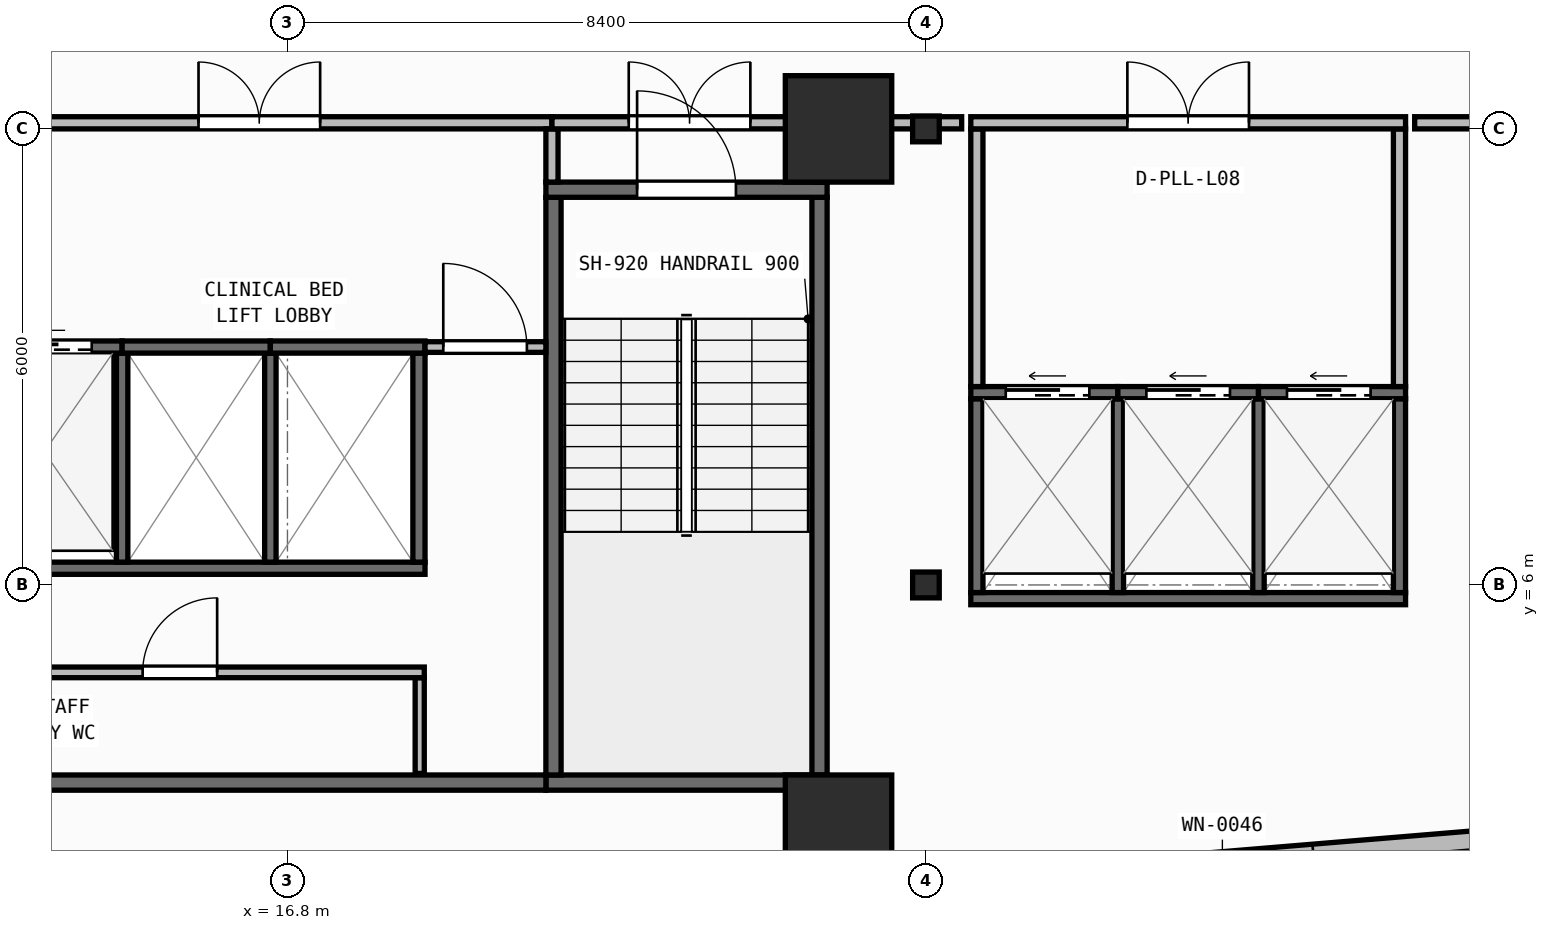
"""IFC4 building model, lengths in metres.
Left out: names, types, materials, properties, quantities, classifications, styles, units other than length and angle.
Written with IfcOpenShell. Run it as: python <this file> out.ifc"""

import sys

from ifc_helpers import new_model, si_unit, direction, frame, frame_2d, origin, origin_2d, place, context, subcontext, project, spatial, rectangle, i_section, extrude, element, fill, save


model = new_model("IFC4")
c1 = context("Model", 3, precision=1e-05, world=origin(), true_north=direction((0.0, 1.0)))
c2 = subcontext(c1, "Body", "Model", "MODEL_VIEW")
j1 = project(units=[si_unit("LENGTHUNIT", "METRE"), si_unit("PLANEANGLEUNIT", "RADIAN")], contexts=[c1])
p1 = place(None, origin())
s1 = spatial("IfcSite", under=j1, at=p1, CompositionType="ELEMENT")
p2 = place(p1, origin())
s2 = spatial("IfcBuilding", under=s1, at=p2, CompositionType="ELEMENT")
p3 = place(p2, frame((0.0, 0.0, 34.35)))
s3 = spatial("IfcBuildingStorey", under=s2, at=p3, CompositionType="ELEMENT", Elevation=34.35)
p4 = place(p3, frame((24.05, 2.8, 0.0), z_axis=(0.0, 0.0, 1.0), x_axis=(1.0, 0.0, 0.0)))
e1 = element("IfcColumn", 1, at=p4, inside=s3, PredefinedType="COLUMN", context=c2, shape_type="SweptSolid", body=[
    extrude(rectangle(XDim=1.4, YDim=1.4, at=origin_2d()), origin(), (0.0, 0.0, 1.0), 3.95),
])
p5 = place(p3, frame((25.2, 6.0, 0.0), z_axis=(0.0, 0.0, 1.0), x_axis=(1.0, 0.0, 0.0)))
e2 = element("IfcColumn", 2, at=p5, inside=s3, PredefinedType="COLUMN", context=c2, shape_type="SweptSolid", body=[
    extrude(i_section(OverallWidth=0.35, OverallDepth=0.34, WebThickness=0.016, FlangeThickness=0.028, at=origin_2d()), origin(), (0.0, 0.0, 1.0), 3.95),
])
p6 = place(p3, frame((24.05, 12.0, 0.0), z_axis=(0.0, 0.0, 1.0), x_axis=(1.0, 0.0, 0.0)))
e3 = element("IfcColumn", 3, at=p6, inside=s3, PredefinedType="COLUMN", context=c2, shape_type="SweptSolid", body=[
    extrude(rectangle(XDim=1.4, YDim=1.4, at=origin_2d()), origin(), (0.0, 0.0, 1.0), 3.95),
])
p7 = place(p3, frame((25.2, 12.0, 0.0), z_axis=(0.0, 0.0, 1.0), x_axis=(1.0, 0.0, 0.0)))
e4 = element("IfcColumn", 4, at=p7, inside=s3, PredefinedType="COLUMN", context=c2, shape_type="SweptSolid", body=[
    extrude(i_section(OverallWidth=0.35, OverallDepth=0.34, WebThickness=0.016, FlangeThickness=0.028, at=origin_2d()), origin(), (0.0, 0.0, 1.0), 3.95),
])
p8 = place(p3, frame((2.76, 0.174, 0.0), z_axis=(0.0, 0.0, 1.0), x_axis=(0.996571478456, 0.082736257641, 0.0)))
e5 = element("IfcWall", 5, at=p8, inside=s3, PredefinedType="STANDARD", context=c2, shape_type="SweptSolid", body=[
    extrude(rectangle(XDim=52.861, YDim=0.26, at=frame_2d((26.431, 0.0))), origin(), (0.0, 0.0, 1.0), 3.71),
])
p9 = place(p8, frame((25.231, 0.0, 0.9)))
e6 = element("IfcOpeningElement", 6, at=p9, cuts=e5, PredefinedType="OPENING", context=c2, shape_type="SweptSolid", body=[
    extrude(rectangle(XDim=2.4, YDim=1.65, at=frame_2d((1.2, 0.825))), frame((0.0, 0.14, 0.0), z_axis=(0.0, -1.0, 0.0), x_axis=(1.0, 0.0, 0.0)), (0.0, 0.0, 1.0), 0.28),
])
p10 = place(p3, frame((20.2, 3.4, 0.0), z_axis=(0.0, 0.0, 1.0), x_axis=(1.0, 0.0, 0.0)))
e7 = element("IfcWall", 7, at=p10, inside=s3, PredefinedType="SHEAR", context=c2, shape_type="SweptSolid", body=[
    extrude(rectangle(XDim=3.7, YDim=0.2, at=frame_2d((1.85, 0.0))), origin(), (0.0, 0.0, 1.0), 3.71),
])
for number, where, z_axis, x_axis in (
    (8, (20.3, 3.5, 0.0), (0.0, 0.0, 1.0), (0.0, 1.0, 0.0)),
    (9, (23.8, 3.5, 0.0), (0.0, 0.0, 1.0), (0.0, 1.0, 0.0)),
):
    element("IfcWall", number, at=place(p3, frame(where, z_axis=z_axis, x_axis=x_axis)), inside=s3, PredefinedType="SHEAR", context=c2, shape_type="SweptSolid", body=[
        extrude(rectangle(XDim=7.6, YDim=0.2, at=frame_2d((3.8, 0.0))), origin(), (0.0, 0.0, 1.0), 3.71),
    ])
p11 = place(p3, frame((20.2, 11.2, 0.0), z_axis=(0.0, 0.0, 1.0), x_axis=(1.0, 0.0, 0.0)))
e10 = element("IfcWall", 10, at=p11, inside=s3, PredefinedType="SHEAR", context=c2, shape_type="SweptSolid", body=[
    extrude(rectangle(XDim=3.7, YDim=0.2, at=frame_2d((1.85, 0.0))), origin(), (0.0, 0.0, 1.0), 3.71),
])
p12 = place(p11, frame((1.2, 0.0, 0.0)))
e11 = element("IfcOpeningElement", 11, at=p12, cuts=e10, PredefinedType="OPENING", context=c2, shape_type="SweptSolid", body=[
    extrude(rectangle(XDim=1.3, YDim=2.15, at=frame_2d((0.65, 1.075))), frame((0.0, 0.11, 0.0), z_axis=(0.0, -1.0, 0.0), x_axis=(1.0, 0.0, 0.0)), (0.0, 0.0, 1.0), 0.22),
])
p13 = place(p3, frame((6.5, 3.4, 0.0), z_axis=(0.0, 0.0, 1.0), x_axis=(1.0, 0.0, 0.0)))
e12 = element("IfcWall", 12, at=p13, inside=s3, PredefinedType="SHEAR", context=c2, shape_type="SweptSolid", body=[
    extrude(rectangle(XDim=13.7, YDim=0.2, at=frame_2d((6.85, 0.0))), origin(), (0.0, 0.0, 1.0), 3.71),
])
p14 = place(p3, frame((6.5, 6.22, 0.0), z_axis=(0.0, 0.0, 1.0), x_axis=(1.0, 0.0, 0.0)))
e13 = element("IfcWall", 13, at=p14, inside=s3, PredefinedType="SHEAR", context=c2, shape_type="SweptSolid", body=[
    extrude(rectangle(XDim=12.11, YDim=0.16, at=frame_2d((6.055, 0.0))), origin(), (0.0, 0.0, 1.0), 3.71),
])
p15 = place(p3, frame((18.53, 6.3, 0.0), z_axis=(0.0, 0.0, 1.0), x_axis=(0.0, 1.0, 0.0)))
e14 = element("IfcWall", 14, at=p15, inside=s3, PredefinedType="SHEAR", context=c2, shape_type="SweptSolid", body=[
    extrude(rectangle(XDim=2.75, YDim=0.16, at=frame_2d((1.375, 0.0))), origin(), (0.0, 0.0, 1.0), 3.71),
])
for number, where, z_axis, x_axis in (
    (15, (14.625, 6.3, 0.0), (0.0, 0.0, 1.0), (0.0, 1.0, 0.0)),
    (16, (16.575, 6.3, 0.0), (0.0, 0.0, 1.0), (0.0, 1.0, 0.0)),
):
    element("IfcWall", number, at=place(p3, frame(where, z_axis=z_axis, x_axis=x_axis)), inside=s3, PredefinedType="SHEAR", context=c2, shape_type="SweptSolid", body=[
        extrude(rectangle(XDim=2.75, YDim=0.15, at=frame_2d((1.375, 0.0))), origin(), (0.0, 0.0, 1.0), 3.71),
    ])
p16 = place(p3, frame((12.575, 9.13, 0.0), z_axis=(0.0, 0.0, 1.0), x_axis=(1.0, 0.0, 0.0)))
e17 = element("IfcWall", 17, at=p16, inside=s3, PredefinedType="SHEAR", context=c2, shape_type="SweptSolid", body=[
    extrude(rectangle(XDim=2.05, YDim=0.16, at=frame_2d((1.025, 0.0))), origin(), (0.0, 0.0, 1.0), 3.71),
])
p17 = place(p16, frame((0.4, 0.0, 0.0)))
e18 = element("IfcOpeningElement", 18, at=p17, cuts=e17, PredefinedType="OPENING", context=c2, shape_type="SweptSolid", body=[
    extrude(rectangle(XDim=1.25, YDim=2.15, at=frame_2d((0.625, 1.075))), frame((0.0, 0.09, 0.0), z_axis=(0.0, -1.0, 0.0), x_axis=(1.0, 0.0, 0.0)), (0.0, 0.0, 1.0), 0.18),
])
p18 = place(p3, frame((14.625, 9.13, 0.0), z_axis=(0.0, 0.0, 1.0), x_axis=(1.0, 0.0, 0.0)))
e19 = element("IfcWall", 19, at=p18, inside=s3, PredefinedType="SHEAR", context=c2, shape_type="SweptSolid", body=[
    extrude(rectangle(XDim=1.95, YDim=0.16, at=frame_2d((0.975, 0.0))), origin(), (0.0, 0.0, 1.0), 3.71),
])
p19 = place(p3, frame((16.575, 9.13, 0.0), z_axis=(0.0, 0.0, 1.0), x_axis=(1.0, 0.0, 0.0)))
e20 = element("IfcWall", 20, at=p19, inside=s3, PredefinedType="SHEAR", context=c2, shape_type="SweptSolid", body=[
    extrude(rectangle(XDim=2.035, YDim=0.16, at=frame_2d((1.018, 0.0))), origin(), (0.0, 0.0, 1.0), 3.71),
])
p20 = place(p3, frame((25.79, 5.82, 0.0), z_axis=(0.0, 0.0, 1.0), x_axis=(1.0, 0.0, 0.0)))
e21 = element("IfcWall", 21, at=p20, inside=s3, PredefinedType="SHEAR", context=c2, shape_type="SweptSolid", body=[
    extrude(rectangle(XDim=5.72, YDim=0.16, at=frame_2d((2.86, 0.0))), origin(), (0.0, 0.0, 1.0), 3.71),
])
for number, where, z_axis, x_axis in (
    (22, (25.87, 5.9, 0.0), (0.0, 0.0, 1.0), (0.0, 1.0, 0.0)),
    (23, (31.43, 5.9, 0.0), (0.0, 0.0, 1.0), (0.0, 1.0, 0.0)),
):
    element("IfcWall", number, at=place(p3, frame(where, z_axis=z_axis, x_axis=x_axis)), inside=s3, PredefinedType="SHEAR", context=c2, shape_type="SweptSolid", body=[
        extrude(rectangle(XDim=2.55, YDim=0.16, at=frame_2d((1.275, 0.0))), origin(), (0.0, 0.0, 1.0), 3.71),
    ])
for number, where, z_axis, x_axis in (
    (24, (27.725, 5.9, 0.0), (0.0, 0.0, 1.0), (0.0, 1.0, 0.0)),
    (25, (29.575, 5.9, 0.0), (0.0, 0.0, 1.0), (0.0, 1.0, 0.0)),
):
    element("IfcWall", number, at=place(p3, frame(where, z_axis=z_axis, x_axis=x_axis)), inside=s3, PredefinedType="SHEAR", context=c2, shape_type="SweptSolid", body=[
        extrude(rectangle(XDim=2.55, YDim=0.15, at=frame_2d((1.275, 0.0))), origin(), (0.0, 0.0, 1.0), 3.71),
    ])
p21 = place(p3, frame((25.79, 8.53, 0.0), z_axis=(0.0, 0.0, 1.0), x_axis=(1.0, 0.0, 0.0)))
e26 = element("IfcWall", 26, at=p21, inside=s3, PredefinedType="SHEAR", context=c2, shape_type="SweptSolid", body=[
    extrude(rectangle(XDim=1.935, YDim=0.16, at=frame_2d((0.968, 0.0))), origin(), (0.0, 0.0, 1.0), 3.71),
])
p22 = place(p21, frame((0.46, 0.0, 0.0)))
e27 = element("IfcOpeningElement", 27, at=p22, cuts=e26, PredefinedType="OPENING", context=c2, shape_type="SweptSolid", body=[
    extrude(rectangle(XDim=1.1, YDim=2.15, at=frame_2d((0.55, 1.075))), frame((0.0, 0.09, 0.0), z_axis=(0.0, -1.0, 0.0), x_axis=(1.0, 0.0, 0.0)), (0.0, 0.0, 1.0), 0.18),
])
p23 = place(p3, frame((27.725, 8.53, 0.0), z_axis=(0.0, 0.0, 1.0), x_axis=(1.0, 0.0, 0.0)))
e28 = element("IfcWall", 28, at=p23, inside=s3, PredefinedType="SHEAR", context=c2, shape_type="SweptSolid", body=[
    extrude(rectangle(XDim=1.85, YDim=0.16, at=frame_2d((0.925, 0.0))), origin(), (0.0, 0.0, 1.0), 3.71),
])
p24 = place(p23, frame((0.375, 0.0, 0.0)))
e29 = element("IfcOpeningElement", 29, at=p24, cuts=e28, PredefinedType="OPENING", context=c2, shape_type="SweptSolid", body=[
    extrude(rectangle(XDim=1.1, YDim=2.15, at=frame_2d((0.55, 1.075))), frame((0.0, 0.09, 0.0), z_axis=(0.0, -1.0, 0.0), x_axis=(1.0, 0.0, 0.0)), (0.0, 0.0, 1.0), 0.18),
])
p25 = place(p3, frame((29.575, 8.53, 0.0), z_axis=(0.0, 0.0, 1.0), x_axis=(1.0, 0.0, 0.0)))
e30 = element("IfcWall", 30, at=p25, inside=s3, PredefinedType="SHEAR", context=c2, shape_type="SweptSolid", body=[
    extrude(rectangle(XDim=1.935, YDim=0.16, at=frame_2d((0.968, 0.0))), origin(), (0.0, 0.0, 1.0), 3.71),
])
p26 = place(p25, frame((0.375, 0.0, 0.0)))
e31 = element("IfcOpeningElement", 31, at=p26, cuts=e30, PredefinedType="OPENING", context=c2, shape_type="SweptSolid", body=[
    extrude(rectangle(XDim=1.1, YDim=2.15, at=frame_2d((0.55, 1.075))), frame((0.0, 0.09, 0.0), z_axis=(0.0, -1.0, 0.0), x_axis=(1.0, 0.0, 0.0)), (0.0, 0.0, 1.0), 0.18),
])
p27 = place(p3, frame((18.54, 3.52, 0.0), z_axis=(0.0, 0.0, 1.0), x_axis=(0.0, 1.0, 0.0)))
e32 = element("IfcWall", 32, at=p27, inside=s3, PredefinedType="PARTITIONING", context=c2, shape_type="SweptSolid", body=[
    extrude(rectangle(XDim=1.26, YDim=0.12, at=frame_2d((0.63, 0.0))), origin(), (0.0, 0.0, 1.0), 3.71),
])
p28 = place(p3, frame((12.17, 4.85, 0.0), z_axis=(0.0, 0.0, 1.0), x_axis=(1.0, 0.0, 0.0)))
e33 = element("IfcWall", 33, at=p28, inside=s3, PredefinedType="PARTITIONING", context=c2, shape_type="SweptSolid", body=[
    extrude(rectangle(XDim=6.43, YDim=0.14, at=frame_2d((3.215, 0.0))), origin(), (0.0, 0.0, 1.0), 3.71),
])
p29 = place(p28, frame((2.725, 0.0, 0.0)))
e34 = element("IfcOpeningElement", 34, at=p29, cuts=e33, PredefinedType="OPENING", context=c2, shape_type="SweptSolid", body=[
    extrude(rectangle(XDim=0.98, YDim=2.1, at=frame_2d((0.49, 1.05))), frame((0.0, 0.08, 0.0), z_axis=(0.0, -1.0, 0.0), x_axis=(1.0, 0.0, 0.0)), (0.0, 0.0, 1.0), 0.16),
])
p30 = place(p3, frame((18.61, 9.13, 0.0), z_axis=(0.0, 0.0, 1.0), x_axis=(1.0, 0.0, 0.0)))
e35 = element("IfcWall", 35, at=p30, inside=s3, PredefinedType="PARTITIONING", context=c2, shape_type="SweptSolid", body=[
    extrude(rectangle(XDim=1.59, YDim=0.14, at=frame_2d((0.795, 0.0))), origin(), (0.0, 0.0, 1.0), 3.71),
])
p31 = place(p30, frame((0.24, 0.0, 0.0)))
e36 = element("IfcOpeningElement", 36, at=p31, cuts=e35, PredefinedType="OPENING", context=c2, shape_type="SweptSolid", body=[
    extrude(rectangle(XDim=1.1, YDim=2.1, at=frame_2d((0.55, 1.05))), frame((0.0, 0.08, 0.0), z_axis=(0.0, -1.0, 0.0), x_axis=(1.0, 0.0, 0.0)), (0.0, 0.0, 1.0), 0.16),
])
p32 = place(p3, frame((12.58, 12.08, 0.0), z_axis=(0.0, 0.0, 1.0), x_axis=(1.0, 0.0, 0.0)))
e37 = element("IfcWall", 37, at=p32, inside=s3, PredefinedType="PARTITIONING", context=c2, shape_type="SweptSolid", body=[
    extrude(rectangle(XDim=7.7, YDim=0.16, at=frame_2d((3.85, 0.0))), origin(), (0.0, 0.0, 1.0), 3.073),
])
p33 = place(p32, frame((3.05, 0.0, 0.0)))
e38 = element("IfcOpeningElement", 38, at=p33, cuts=e37, PredefinedType="OPENING", context=c2, shape_type="SweptSolid", body=[
    extrude(rectangle(XDim=1.6, YDim=2.05, at=frame_2d((0.8, 1.025))), frame((0.0, 0.09, 0.0), z_axis=(0.0, -1.0, 0.0), x_axis=(1.0, 0.0, 0.0)), (0.0, 0.0, 1.0), 0.18),
])
p34 = place(p3, frame((20.28, 11.3, 0.0), z_axis=(0.0, 0.0, 1.0), x_axis=(0.0, 1.0, 0.0)))
e39 = element("IfcWall", 39, at=p34, inside=s3, PredefinedType="PARTITIONING", context=c2, shape_type="SweptSolid", body=[
    extrude(rectangle(XDim=0.7, YDim=0.16, at=frame_2d((0.35, 0.0))), origin(), (0.0, 0.0, 1.0), 3.71),
])
p35 = place(p3, frame((20.28, 12.08, 0.0), z_axis=(0.0, 0.0, 1.0), x_axis=(1.0, 0.0, 0.0)))
e40 = element("IfcWall", 40, at=p35, inside=s3, PredefinedType="PARTITIONING", context=c2, shape_type="SweptSolid", body=[
    extrude(rectangle(XDim=3.62, YDim=0.16, at=frame_2d((1.81, 0.0))), origin(), (0.0, 0.0, 1.0), 3.073),
])
p36 = place(p35, frame((1.01, 0.0, 0.0)))
e41 = element("IfcOpeningElement", 41, at=p36, cuts=e40, PredefinedType="OPENING", context=c2, shape_type="SweptSolid", body=[
    extrude(rectangle(XDim=1.6, YDim=2.05, at=frame_2d((0.8, 1.025))), frame((0.0, 0.09, 0.0), z_axis=(0.0, -1.0, 0.0), x_axis=(1.0, 0.0, 0.0)), (0.0, 0.0, 1.0), 0.18),
])
p37 = place(p3, frame((23.82, 11.3, 0.0), z_axis=(0.0, 0.0, 1.0), x_axis=(0.0, 1.0, 0.0)))
e42 = element("IfcWall", 42, at=p37, inside=s3, PredefinedType="PARTITIONING", context=c2, shape_type="SweptSolid", body=[
    extrude(rectangle(XDim=0.7, YDim=0.16, at=frame_2d((0.35, 0.0))), origin(), (0.0, 0.0, 1.0), 3.71),
])
for number, where, z_axis, x_axis in (
    (43, (25.87, 8.61, 0.0), (0.0, 0.0, 1.0), (0.0, 1.0, 0.0)),
    (44, (31.43, 8.61, 0.0), (0.0, 0.0, 1.0), (0.0, 1.0, 0.0)),
):
    element("IfcWall", number, at=place(p3, frame(where, z_axis=z_axis, x_axis=x_axis)), inside=s3, PredefinedType="PARTITIONING", context=c2, shape_type="SweptSolid", body=[
        extrude(rectangle(XDim=3.39, YDim=0.16, at=frame_2d((1.695, 0.0))), origin(), (0.0, 0.0, 1.0), 3.71),
    ])
p38 = place(p3, frame((25.79, 12.08, 0.0), z_axis=(0.0, 0.0, 1.0), x_axis=(1.0, 0.0, 0.0)))
e45 = element("IfcWall", 45, at=p38, inside=s3, PredefinedType="PARTITIONING", context=c2, shape_type="SweptSolid", body=[
    extrude(rectangle(XDim=5.72, YDim=0.16, at=frame_2d((2.86, 0.0))), origin(), (0.0, 0.0, 1.0), 3.073),
])
p39 = place(p38, frame((2.06, 0.0, 0.0)))
e46 = element("IfcOpeningElement", 46, at=p39, cuts=e45, PredefinedType="OPENING", context=c2, shape_type="SweptSolid", body=[
    extrude(rectangle(XDim=1.6, YDim=2.05, at=frame_2d((0.8, 1.025))), frame((0.0, 0.09, 0.0), z_axis=(0.0, -1.0, 0.0), x_axis=(1.0, 0.0, 0.0)), (0.0, 0.0, 1.0), 0.18),
])
p40 = place(p3, frame((24.02, 12.08, 0.0), z_axis=(0.0, 0.0, 1.0), x_axis=(1.0, 0.0, 0.0)))
e47 = element("IfcWall", 47, at=p40, inside=s3, PredefinedType="PARTITIONING", context=c2, shape_type="SweptSolid", body=[
    extrude(rectangle(XDim=1.65, YDim=0.16, at=frame_2d((0.825, 0.0))), origin(), (0.0, 0.0, 1.0), 3.073),
])
p41 = place(p3, frame((31.63, 12.08, 0.0), z_axis=(0.0, 0.0, 1.0), x_axis=(1.0, 0.0, 0.0)))
e48 = element("IfcWall", 48, at=p41, inside=s3, PredefinedType="PARTITIONING", context=c2, shape_type="SweptSolid", body=[
    extrude(rectangle(XDim=11.181, YDim=0.16, at=frame_2d((5.59, 0.0))), origin(), (0.0, 0.0, 1.0), 3.073),
])
p42 = place(p12, origin())
e49 = element("IfcDoor", 49, at=p42, inside=s3, OperationType="SINGLE_SWING_LEFT", PredefinedType="DOOR", context=c2, shape_type="SweptSolid", body=[
    extrude(rectangle(XDim=1.3, YDim=2.15, at=frame_2d((0.65, 1.075))), frame((0.0, 0.025, 0.0), z_axis=(0.0, -1.0, 0.0), x_axis=(1.0, 0.0, 0.0)), (0.0, 0.0, 1.0), 0.05),
])
fill(e11, e49)
p43 = place(p17, origin())
e50 = element("IfcDoor", 50, at=p43, inside=s3, OperationType="SLIDING_TO_LEFT", PredefinedType="DOOR", context=c2, shape_type="SweptSolid", body=[
    extrude(rectangle(XDim=1.25, YDim=2.15, at=frame_2d((0.625, 1.075))), frame((0.0, 0.025, 0.0), z_axis=(0.0, -1.0, 0.0), x_axis=(1.0, 0.0, 0.0)), (0.0, 0.0, 1.0), 0.05),
])
fill(e18, e50)
p44 = place(p22, origin())
e51 = element("IfcDoor", 51, at=p44, inside=s3, OperationType="SLIDING_TO_LEFT", PredefinedType="DOOR", context=c2, shape_type="SweptSolid", body=[
    extrude(rectangle(XDim=1.1, YDim=2.15, at=frame_2d((0.55, 1.075))), frame((0.0, 0.025, 0.0), z_axis=(0.0, -1.0, 0.0), x_axis=(1.0, 0.0, 0.0)), (0.0, 0.0, 1.0), 0.05),
])
fill(e27, e51)
p45 = place(p24, origin())
e52 = element("IfcDoor", 52, at=p45, inside=s3, OperationType="SLIDING_TO_LEFT", PredefinedType="DOOR", context=c2, shape_type="SweptSolid", body=[
    extrude(rectangle(XDim=1.1, YDim=2.15, at=frame_2d((0.55, 1.075))), frame((0.0, 0.025, 0.0), z_axis=(0.0, -1.0, 0.0), x_axis=(1.0, 0.0, 0.0)), (0.0, 0.0, 1.0), 0.05),
])
fill(e29, e52)
p46 = place(p26, origin())
e53 = element("IfcDoor", 53, at=p46, inside=s3, OperationType="SLIDING_TO_LEFT", PredefinedType="DOOR", context=c2, shape_type="SweptSolid", body=[
    extrude(rectangle(XDim=1.1, YDim=2.15, at=frame_2d((0.55, 1.075))), frame((0.0, 0.025, 0.0), z_axis=(0.0, -1.0, 0.0), x_axis=(1.0, 0.0, 0.0)), (0.0, 0.0, 1.0), 0.05),
])
fill(e31, e53)
p47 = place(p29, origin())
e54 = element("IfcDoor", 54, at=p47, inside=s3, OperationType="SINGLE_SWING_RIGHT", PredefinedType="DOOR", context=c2, shape_type="SweptSolid", body=[
    extrude(rectangle(XDim=0.98, YDim=2.1, at=frame_2d((0.49, 1.05))), frame((0.0, 0.025, 0.0), z_axis=(0.0, -1.0, 0.0), x_axis=(1.0, 0.0, 0.0)), (0.0, 0.0, 1.0), 0.05),
])
fill(e34, e54)
p48 = place(p31, origin())
e55 = element("IfcDoor", 55, at=p48, inside=s3, OperationType="SINGLE_SWING_LEFT", PredefinedType="DOOR", context=c2, shape_type="SweptSolid", body=[
    extrude(rectangle(XDim=1.1, YDim=2.1, at=frame_2d((0.55, 1.05))), frame((0.0, 0.025, 0.0), z_axis=(0.0, -1.0, 0.0), x_axis=(1.0, 0.0, 0.0)), (0.0, 0.0, 1.0), 0.05),
])
fill(e36, e55)
p49 = place(p33, origin())
e56 = element("IfcDoor", 56, at=p49, inside=s3, OperationType="DOUBLE_DOOR_SINGLE_SWING", PredefinedType="DOOR", context=c2, shape_type="SweptSolid", body=[
    extrude(rectangle(XDim=1.6, YDim=2.05, at=frame_2d((0.8, 1.025))), frame((0.0, 0.025, 0.0), z_axis=(0.0, -1.0, 0.0), x_axis=(1.0, 0.0, 0.0)), (0.0, 0.0, 1.0), 0.05),
])
fill(e38, e56)
p50 = place(p36, origin())
e57 = element("IfcDoor", 57, at=p50, inside=s3, OperationType="DOUBLE_DOOR_SINGLE_SWING", PredefinedType="DOOR", context=c2, shape_type="SweptSolid", body=[
    extrude(rectangle(XDim=1.6, YDim=2.05, at=frame_2d((0.8, 1.025))), frame((0.0, 0.025, 0.0), z_axis=(0.0, -1.0, 0.0), x_axis=(1.0, 0.0, 0.0)), (0.0, 0.0, 1.0), 0.05),
])
fill(e41, e57)
p51 = place(p39, origin())
e58 = element("IfcDoor", 58, at=p51, inside=s3, OperationType="DOUBLE_DOOR_SINGLE_SWING", PredefinedType="DOOR", context=c2, shape_type="SweptSolid", body=[
    extrude(rectangle(XDim=1.6, YDim=2.05, at=frame_2d((0.8, 1.025))), frame((0.0, 0.025, 0.0), z_axis=(0.0, -1.0, 0.0), x_axis=(1.0, 0.0, 0.0)), (0.0, 0.0, 1.0), 0.05),
])
fill(e46, e58)
save(model, sys.argv[1])
